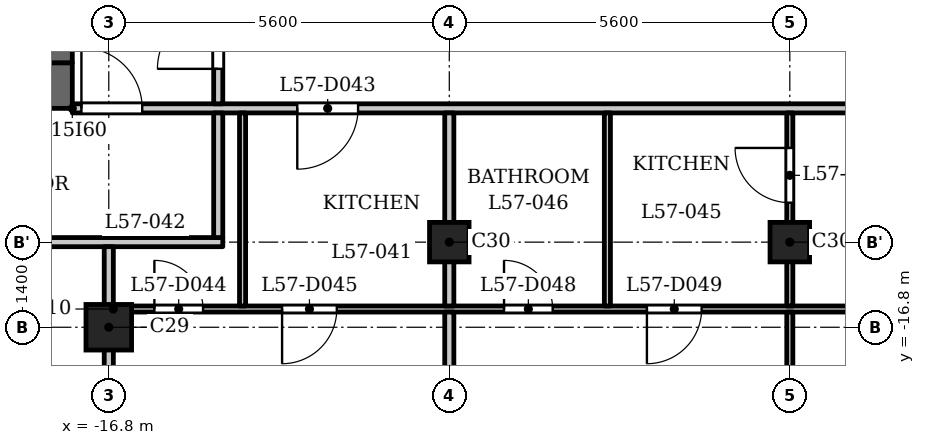
"""IFC4 building model, lengths in metres.
Left out: names, types, materials, properties, quantities, classifications, styles, units other than length and angle.
Written with IfcOpenShell. Run it as: python <this file> out.ifc"""

import sys

from ifc_helpers import new_model, si_unit, direction, frame, frame_2d, origin, origin_2d, place, context, subcontext, project, spatial, rectangle, extrude, element, fill, save


model = new_model("IFC4")
c1 = context("Model", 3, precision=1e-05, world=origin(), true_north=direction((0.0, 1.0)))
c2 = subcontext(c1, "Body", "Model", "MODEL_VIEW")
j1 = project(units=[si_unit("LENGTHUNIT", "METRE"), si_unit("PLANEANGLEUNIT", "RADIAN")], contexts=[c1])
p1 = place(None, origin())
s1 = spatial("IfcSite", under=j1, at=p1, CompositionType="ELEMENT")
p2 = place(p1, origin())
s2 = spatial("IfcBuilding", under=s1, at=p2, CompositionType="ELEMENT")
p3 = place(p2, frame((0.0, 0.0, 220.4)))
s3 = spatial("IfcBuildingStorey", under=s2, at=p3, CompositionType="ELEMENT", Elevation=220.4)
p4 = place(p3, frame((-16.8, -16.8, 0.0), z_axis=(0.0, 0.0, 1.0), x_axis=(1.0, 0.0, 0.0)))
e1 = element("IfcColumn", 1, at=p4, inside=s3, PredefinedType="COLUMN", context=c2, shape_type="SweptSolid", body=[
    extrude(rectangle(XDim=0.75, YDim=0.75, at=origin_2d()), origin(), (0.0, 0.0, 1.0), 3.5),
])
for number, where, z_axis, x_axis in (
    (2, (-11.2, -15.4, 0.0), (0.0, 0.0, 1.0), (1.0, 0.0, 0.0)),
    (3, (-5.6, -15.4, 0.0), (0.0, 0.0, 1.0), (1.0, 0.0, 0.0)),
):
    element("IfcColumn", number, at=place(p3, frame(where, z_axis=z_axis, x_axis=x_axis)), inside=s3, PredefinedType="COLUMN", context=c2, shape_type="SweptSolid", body=[
        extrude(rectangle(XDim=0.65, YDim=0.65, at=origin_2d()), origin(), (0.0, 0.0, 1.0), 3.5),
    ])
p5 = place(p3, frame((-17.4, -12.825, 0.0), z_axis=(0.0, 0.0, 1.0), x_axis=(-1.0, 0.0, 0.0)))
e4 = element("IfcWall", 4, at=p5, inside=s3, PredefinedType="SHEAR", context=c2, shape_type="SweptSolid", body=[
    extrude(rectangle(XDim=7.6, YDim=0.75, at=frame_2d((3.8, 0.0))), origin(), (0.0, 0.0, 1.0), 3.2),
])
p6 = place(p3, frame((-17.6, -12.45, 0.0), z_axis=(0.0, 0.0, 1.0), x_axis=(0.0, 1.0, 0.0)))
e5 = element("IfcWall", 5, at=p6, inside=s3, PredefinedType="SHEAR", context=c2, shape_type="SweptSolid", body=[
    extrude(rectangle(XDim=24.9, YDim=0.4, at=frame_2d((12.45, 0.0))), origin(), (0.0, 0.0, 1.0), 3.2),
])
p7 = place(p6, frame((6.85, 0.0, 0.0)))
e6 = element("IfcOpeningElement", 6, at=p7, cuts=e5, PredefinedType="OPENING", context=c2, shape_type="SweptSolid", body=[
    extrude(rectangle(XDim=0.9, YDim=2.1, at=frame_2d((0.45, 1.05))), frame((0.0, 0.21, 0.0), z_axis=(0.0, -1.0, 0.0), x_axis=(1.0, 0.0, 0.0)), (0.0, 0.0, 1.0), 0.42),
])
p8 = place(p6, frame((10.45, 0.0, 0.0)))
e7 = element("IfcOpeningElement", 7, at=p8, cuts=e5, PredefinedType="OPENING", context=c2, shape_type="SweptSolid", body=[
    extrude(rectangle(XDim=0.9, YDim=2.1, at=frame_2d((0.45, 1.05))), frame((0.0, 0.21, 0.0), z_axis=(0.0, -1.0, 0.0), x_axis=(1.0, 0.0, 0.0)), (0.0, 0.0, 1.0), 0.42),
])
p9 = place(p6, frame((15.6, 0.0, 0.0)))
e8 = element("IfcOpeningElement", 8, at=p9, cuts=e5, PredefinedType="OPENING", context=c2, shape_type="SweptSolid", body=[
    extrude(rectangle(XDim=1.1, YDim=2.1, at=frame_2d((0.55, 1.05))), frame((0.0, 0.21, 0.0), z_axis=(0.0, -1.0, 0.0), x_axis=(1.0, 0.0, 0.0)), (0.0, 0.0, 1.0), 0.42),
])
p10 = place(p6, frame((18.0, 0.0, 0.0)))
e9 = element("IfcOpeningElement", 9, at=p10, cuts=e5, PredefinedType="OPENING", context=c2, shape_type="SweptSolid", body=[
    extrude(rectangle(XDim=1.1, YDim=2.1, at=frame_2d((0.55, 1.05))), frame((0.0, 0.21, 0.0), z_axis=(0.0, -1.0, 0.0), x_axis=(1.0, 0.0, 0.0)), (0.0, 0.0, 1.0), 0.42),
])
p11 = place(p6, frame((23.025, 0.0, 0.0)))
e10 = element("IfcOpeningElement", 10, at=p11, cuts=e5, PredefinedType="OPENING", context=c2, shape_type="SweptSolid", body=[
    extrude(rectangle(XDim=1.1, YDim=2.1, at=frame_2d((0.55, 1.05))), frame((0.0, 0.21, 0.0), z_axis=(0.0, -1.0, 0.0), x_axis=(1.0, 0.0, 0.0)), (0.0, 0.0, 1.0), 0.42),
])
p12 = place(p6, frame((0.775, 0.0, 0.0)))
e11 = element("IfcOpeningElement", 11, at=p12, cuts=e5, PredefinedType="OPENING", context=c2, shape_type="SweptSolid", body=[
    extrude(rectangle(XDim=1.1, YDim=2.1, at=frame_2d((0.55, 1.05))), frame((0.0, 0.21, 0.0), z_axis=(0.0, -1.0, 0.0), x_axis=(1.0, 0.0, 0.0)), (0.0, 0.0, 1.0), 0.42),
])
p13 = place(p6, frame((12.925, 0.0, 0.0)))
e12 = element("IfcOpeningElement", 12, at=p13, cuts=e5, PredefinedType="OPENING", context=c2, shape_type="SweptSolid", body=[
    extrude(rectangle(XDim=1.8, YDim=2.1, at=frame_2d((0.9, 1.05))), frame((0.0, 0.21, 0.0), z_axis=(0.0, -1.0, 0.0), x_axis=(1.0, 0.0, 0.0)), (0.0, 0.0, 1.0), 0.42),
])
p14 = place(p3, frame((-16.725, -16.5, 0.0), z_axis=(0.0, 0.0, 1.0), x_axis=(1.0, 0.0, 0.0)))
e13 = element("IfcWall", 13, at=p14, inside=s3, PredefinedType="PARTITIONING", context=c2, shape_type="SweptSolid", body=[
    extrude(rectangle(XDim=33.45, YDim=0.1, at=frame_2d((16.725, 0.0))), origin(), (0.0, 0.0, 1.0), 3.2),
])
p15 = place(p14, frame((0.675, 0.0, 0.0)))
e14 = element("IfcOpeningElement", 14, at=p15, cuts=e13, PredefinedType="OPENING", context=c2, shape_type="SweptSolid", body=[
    extrude(rectangle(XDim=0.8, YDim=2.1, at=frame_2d((0.4, 1.05))), frame((0.0, 0.06, 0.0), z_axis=(0.0, -1.0, 0.0), x_axis=(1.0, 0.0, 0.0)), (0.0, 0.0, 1.0), 0.12),
])
p16 = place(p14, frame((2.775, 0.0, 0.0)))
e15 = element("IfcOpeningElement", 15, at=p16, cuts=e13, PredefinedType="OPENING", context=c2, shape_type="SweptSolid", body=[
    extrude(rectangle(XDim=0.9, YDim=2.1, at=frame_2d((0.45, 1.05))), frame((0.0, 0.06, 0.0), z_axis=(0.0, -1.0, 0.0), x_axis=(1.0, 0.0, 0.0)), (0.0, 0.0, 1.0), 0.12),
])
p17 = place(p14, frame((6.425, 0.0, 0.0)))
e16 = element("IfcOpeningElement", 16, at=p17, cuts=e13, PredefinedType="OPENING", context=c2, shape_type="SweptSolid", body=[
    extrude(rectangle(XDim=0.8, YDim=2.1, at=frame_2d((0.4, 1.05))), frame((0.0, 0.06, 0.0), z_axis=(0.0, -1.0, 0.0), x_axis=(1.0, 0.0, 0.0)), (0.0, 0.0, 1.0), 0.12),
])
p18 = place(p14, frame((8.775, 0.0, 0.0)))
e17 = element("IfcOpeningElement", 17, at=p18, cuts=e13, PredefinedType="OPENING", context=c2, shape_type="SweptSolid", body=[
    extrude(rectangle(XDim=0.9, YDim=2.1, at=frame_2d((0.45, 1.05))), frame((0.0, 0.06, 0.0), z_axis=(0.0, -1.0, 0.0), x_axis=(1.0, 0.0, 0.0)), (0.0, 0.0, 1.0), 0.12),
])
p19 = place(p14, frame((12.525, 0.0, 0.0)))
e18 = element("IfcOpeningElement", 18, at=p19, cuts=e13, PredefinedType="OPENING", context=c2, shape_type="SweptSolid", body=[
    extrude(rectangle(XDim=0.9, YDim=2.1, at=frame_2d((0.45, 1.05))), frame((0.0, 0.06, 0.0), z_axis=(0.0, -1.0, 0.0), x_axis=(1.0, 0.0, 0.0)), (0.0, 0.0, 1.0), 0.12),
])
p20 = place(p14, frame((14.775, 0.0, 0.0)))
e19 = element("IfcOpeningElement", 19, at=p20, cuts=e13, PredefinedType="OPENING", context=c2, shape_type="SweptSolid", body=[
    extrude(rectangle(XDim=0.9, YDim=2.1, at=frame_2d((0.45, 1.05))), frame((0.0, 0.06, 0.0), z_axis=(0.0, -1.0, 0.0), x_axis=(1.0, 0.0, 0.0)), (0.0, 0.0, 1.0), 0.12),
])
p21 = place(p14, frame((25.475, 0.0, 0.0)))
e20 = element("IfcOpeningElement", 20, at=p21, cuts=e13, PredefinedType="OPENING", context=c2, shape_type="SweptSolid", body=[
    extrude(rectangle(XDim=0.8, YDim=2.1, at=frame_2d((0.4, 1.05))), frame((0.0, 0.06, 0.0), z_axis=(0.0, -1.0, 0.0), x_axis=(1.0, 0.0, 0.0)), (0.0, 0.0, 1.0), 0.12),
])
p22 = place(p14, frame((23.225, 0.0, 0.0)))
e21 = element("IfcOpeningElement", 21, at=p22, cuts=e13, PredefinedType="OPENING", context=c2, shape_type="SweptSolid", body=[
    extrude(rectangle(XDim=0.9, YDim=2.1, at=frame_2d((0.45, 1.05))), frame((0.0, 0.06, 0.0), z_axis=(0.0, -1.0, 0.0), x_axis=(1.0, 0.0, 0.0)), (0.0, 0.0, 1.0), 0.12),
])
p23 = place(p14, frame((17.875, 0.0, 0.0)))
e22 = element("IfcOpeningElement", 22, at=p23, cuts=e13, PredefinedType="OPENING", context=c2, shape_type="SweptSolid", body=[
    extrude(rectangle(XDim=0.9, YDim=2.1, at=frame_2d((0.45, 1.05))), frame((0.0, 0.06, 0.0), z_axis=(0.0, -1.0, 0.0), x_axis=(1.0, 0.0, 0.0)), (0.0, 0.0, 1.0), 0.12),
])
p24 = place(p14, frame((19.975, 0.0, 0.0)))
e23 = element("IfcOpeningElement", 23, at=p24, cuts=e13, PredefinedType="OPENING", context=c2, shape_type="SweptSolid", body=[
    extrude(rectangle(XDim=0.9, YDim=2.1, at=frame_2d((0.45, 1.05))), frame((0.0, 0.06, 0.0), z_axis=(0.0, -1.0, 0.0), x_axis=(1.0, 0.0, 0.0)), (0.0, 0.0, 1.0), 0.12),
])
p25 = place(p14, frame((30.825, 0.0, 0.0)))
e24 = element("IfcOpeningElement", 24, at=p25, cuts=e13, PredefinedType="OPENING", context=c2, shape_type="SweptSolid", body=[
    extrude(rectangle(XDim=0.8, YDim=2.1, at=frame_2d((0.4, 1.05))), frame((0.0, 0.06, 0.0), z_axis=(0.0, -1.0, 0.0), x_axis=(1.0, 0.0, 0.0)), (0.0, 0.0, 1.0), 0.12),
])
p26 = place(p14, frame((29.075, 0.0, 0.0)))
e25 = element("IfcOpeningElement", 25, at=p26, cuts=e13, PredefinedType="OPENING", context=c2, shape_type="SweptSolid", body=[
    extrude(rectangle(XDim=0.9, YDim=2.1, at=frame_2d((0.45, 1.05))), frame((0.0, 0.06, 0.0), z_axis=(0.0, -1.0, 0.0), x_axis=(1.0, 0.0, 0.0)), (0.0, 0.0, 1.0), 0.12),
])
p27 = place(p3, frame((-24.684, -15.4, 0.0), z_axis=(0.0, 0.0, 1.0), x_axis=(1.0, 0.0, 0.0)))
e26 = element("IfcWall", 26, at=p27, inside=s3, PredefinedType="PARTITIONING", context=c2, shape_type="SweptSolid", body=[
    extrude(rectangle(XDim=9.759, YDim=0.15, at=frame_2d((4.879, 0.0))), origin(), (0.0, 0.0, 1.0), 3.2),
])
p28 = place(p27, frame((1.143, 0.0, 0.0)))
e27 = element("IfcOpeningElement", 27, at=p28, cuts=e26, PredefinedType="OPENING", context=c2, shape_type="SweptSolid", body=[
    extrude(rectangle(XDim=1.0, YDim=2.1, at=frame_2d((0.5, 1.05))), frame((0.0, 0.085, 0.0), z_axis=(0.0, -1.0, 0.0), x_axis=(1.0, 0.0, 0.0)), (0.0, 0.0, 1.0), 0.17),
])
p29 = place(p3, frame((-17.4, -13.2, 0.0), z_axis=(0.0, 0.0, 1.0), x_axis=(1.0, 0.0, 0.0)))
e28 = element("IfcWall", 28, at=p29, inside=s3, PredefinedType="PARTITIONING", context=c2, shape_type="SweptSolid", body=[
    extrude(rectangle(XDim=34.8, YDim=0.15, at=frame_2d((17.4, 0.0))), origin(), (0.0, 0.0, 1.0), 3.2),
])
p30 = place(p29, frame((0.15, 0.0, 0.0)))
e29 = element("IfcOpeningElement", 29, at=p30, cuts=e28, PredefinedType="OPENING", context=c2, shape_type="SweptSolid", body=[
    extrude(rectangle(XDim=1.0, YDim=2.1, at=frame_2d((0.5, 1.05))), frame((0.0, 0.085, 0.0), z_axis=(0.0, -1.0, 0.0), x_axis=(1.0, 0.0, 0.0)), (0.0, 0.0, 1.0), 0.17),
])
p31 = place(p29, frame((33.55, 0.0, 0.0)))
e30 = element("IfcOpeningElement", 30, at=p31, cuts=e28, PredefinedType="OPENING", context=c2, shape_type="SweptSolid", body=[
    extrude(rectangle(XDim=1.0, YDim=2.1, at=frame_2d((0.5, 1.05))), frame((0.0, 0.085, 0.0), z_axis=(0.0, -1.0, 0.0), x_axis=(1.0, 0.0, 0.0)), (0.0, 0.0, 1.0), 0.17),
])
p32 = place(p29, frame((3.7, 0.0, 0.0)))
e31 = element("IfcOpeningElement", 31, at=p32, cuts=e28, PredefinedType="OPENING", context=c2, shape_type="SweptSolid", body=[
    extrude(rectangle(XDim=1.0, YDim=2.1, at=frame_2d((0.5, 1.05))), frame((0.0, 0.085, 0.0), z_axis=(0.0, -1.0, 0.0), x_axis=(1.0, 0.0, 0.0)), (0.0, 0.0, 1.0), 0.17),
])
p33 = place(p29, frame((15.7, 0.0, 0.0)))
e32 = element("IfcOpeningElement", 32, at=p33, cuts=e28, PredefinedType="OPENING", context=c2, shape_type="SweptSolid", body=[
    extrude(rectangle(XDim=1.0, YDim=2.1, at=frame_2d((0.5, 1.05))), frame((0.0, 0.085, 0.0), z_axis=(0.0, -1.0, 0.0), x_axis=(1.0, 0.0, 0.0)), (0.0, 0.0, 1.0), 0.17),
])
p34 = place(p29, frame((21.3, 0.0, 0.0)))
e33 = element("IfcOpeningElement", 33, at=p34, cuts=e28, PredefinedType="OPENING", context=c2, shape_type="SweptSolid", body=[
    extrude(rectangle(XDim=1.0, YDim=2.1, at=frame_2d((0.5, 1.05))), frame((0.0, 0.085, 0.0), z_axis=(0.0, -1.0, 0.0), x_axis=(1.0, 0.0, 0.0)), (0.0, 0.0, 1.0), 0.17),
])
p35 = place(p29, frame((29.5, 0.0, 0.0)))
e34 = element("IfcOpeningElement", 34, at=p35, cuts=e28, PredefinedType="OPENING", context=c2, shape_type="SweptSolid", body=[
    extrude(rectangle(XDim=1.0, YDim=2.1, at=frame_2d((0.5, 1.05))), frame((0.0, 0.085, 0.0), z_axis=(0.0, -1.0, 0.0), x_axis=(1.0, 0.0, 0.0)), (0.0, 0.0, 1.0), 0.17),
])
p36 = place(p3, frame((-16.8, -22.31, 0.0), z_axis=(0.0, 0.0, 1.0), x_axis=(0.0, 1.0, 0.0)))
e35 = element("IfcWall", 35, at=p36, inside=s3, PredefinedType="PARTITIONING", context=c2, shape_type="SweptSolid", body=[
    extrude(rectangle(XDim=6.835, YDim=0.15, at=frame_2d((3.417, 0.0))), origin(), (0.0, 0.0, 1.0), 2.55),
])
p37 = place(p3, frame((-15.0, -15.325, 0.0), z_axis=(0.0, 0.0, 1.0), x_axis=(0.0, 1.0, 0.0)))
e36 = element("IfcWall", 36, at=p37, inside=s3, PredefinedType="PARTITIONING", context=c2, shape_type="SweptSolid", body=[
    extrude(rectangle(XDim=2.05, YDim=0.15, at=frame_2d((1.025, 0.0))), origin(), (0.0, 0.0, 1.0), 3.2),
])
p38 = place(p3, frame((-15.0, -13.125, 0.0), z_axis=(0.0, 0.0, 1.0), x_axis=(0.0, 1.0, 0.0)))
e37 = element("IfcWall", 37, at=p38, inside=s3, PredefinedType="PARTITIONING", context=c2, shape_type="SweptSolid", body=[
    extrude(rectangle(XDim=6.356, YDim=0.15, at=frame_2d((3.178, 0.0))), origin(), (0.0, 0.0, 1.0), 3.2),
])
p39 = place(p38, frame((0.575, 0.0, 0.0)))
e38 = element("IfcOpeningElement", 38, at=p39, cuts=e37, PredefinedType="OPENING", context=c2, shape_type="SweptSolid", body=[
    extrude(rectangle(XDim=1.0, YDim=2.1, at=frame_2d((0.5, 1.05))), frame((0.0, 0.085, 0.0), z_axis=(0.0, -1.0, 0.0), x_axis=(1.0, 0.0, 0.0)), (0.0, 0.0, 1.0), 0.17),
])
p40 = place(p3, frame((-14.6, -16.45, 0.0), z_axis=(0.0, 0.0, 1.0), x_axis=(0.0, 1.0, 0.0)))
e39 = element("IfcWall", 39, at=p40, inside=s3, PredefinedType="PARTITIONING", context=c2, shape_type="SweptSolid", body=[
    extrude(rectangle(XDim=3.175, YDim=0.1, at=frame_2d((1.587, 0.0))), origin(), (0.0, 0.0, 1.0), 3.2),
])
p41 = place(p3, frame((-11.2, -22.08, 0.0), z_axis=(0.0, 0.0, 1.0), x_axis=(0.0, 1.0, 0.0)))
e40 = element("IfcWall", 40, at=p41, inside=s3, PredefinedType="PARTITIONING", context=c2, shape_type="SweptSolid", body=[
    extrude(rectangle(XDim=5.53, YDim=0.15, at=frame_2d((2.765, 0.0))), origin(), (0.0, 0.0, 1.0), 3.2),
])
p42 = place(p3, frame((-11.2, -16.45, 0.0), z_axis=(0.0, 0.0, 1.0), x_axis=(0.0, 1.0, 0.0)))
e41 = element("IfcWall", 41, at=p42, inside=s3, PredefinedType="PARTITIONING", context=c2, shape_type="SweptSolid", body=[
    extrude(rectangle(XDim=3.175, YDim=0.15, at=frame_2d((1.587, 0.0))), origin(), (0.0, 0.0, 1.0), 3.2),
])
p43 = place(p3, frame((-8.6, -16.45, 0.0), z_axis=(0.0, 0.0, 1.0), x_axis=(0.0, 1.0, 0.0)))
e42 = element("IfcWall", 42, at=p43, inside=s3, PredefinedType="PARTITIONING", context=c2, shape_type="SweptSolid", body=[
    extrude(rectangle(XDim=3.175, YDim=0.1, at=frame_2d((1.587, 0.0))), origin(), (0.0, 0.0, 1.0), 3.2),
])
p44 = place(p3, frame((-5.6, -22.08, 0.0), z_axis=(0.0, 0.0, 1.0), x_axis=(0.0, 1.0, 0.0)))
e43 = element("IfcWall", 43, at=p44, inside=s3, PredefinedType="PARTITIONING", context=c2, shape_type="SweptSolid", body=[
    extrude(rectangle(XDim=5.53, YDim=0.1, at=frame_2d((2.765, 0.0))), origin(), (0.0, 0.0, 1.0), 3.2),
])
p45 = place(p3, frame((-5.6, -16.45, 0.0), z_axis=(0.0, 0.0, 1.0), x_axis=(0.0, 1.0, 0.0)))
e44 = element("IfcWall", 44, at=p45, inside=s3, PredefinedType="PARTITIONING", context=c2, shape_type="SweptSolid", body=[
    extrude(rectangle(XDim=3.175, YDim=0.1, at=frame_2d((1.587, 0.0))), origin(), (0.0, 0.0, 1.0), 3.2),
])
p46 = place(p45, frame((1.699, 0.0, 0.0)))
e45 = element("IfcOpeningElement", 45, at=p46, cuts=e44, PredefinedType="OPENING", context=c2, shape_type="SweptSolid", body=[
    extrude(rectangle(XDim=0.9, YDim=2.1, at=frame_2d((0.45, 1.05))), frame((0.0, 0.06, 0.0), z_axis=(0.0, -1.0, 0.0), x_axis=(1.0, 0.0, 0.0)), (0.0, 0.0, 1.0), 0.12),
])
p47 = place(p39, origin())
e46 = element("IfcDoor", 46, at=p47, inside=s3, OperationType="SINGLE_SWING_RIGHT", PredefinedType="DOOR", context=c2, shape_type="SweptSolid", body=[
    extrude(rectangle(XDim=1.0, YDim=2.1, at=frame_2d((0.5, 1.05))), frame((0.0, 0.025, 0.0), z_axis=(0.0, -1.0, 0.0), x_axis=(1.0, 0.0, 0.0)), (0.0, 0.0, 1.0), 0.05),
])
fill(e38, e46)
p48 = place(p30, origin())
e47 = element("IfcDoor", 47, at=p48, inside=s3, OperationType="SINGLE_SWING_RIGHT", PredefinedType="DOOR", context=c2, shape_type="SweptSolid", body=[
    extrude(rectangle(XDim=1.0, YDim=2.1, at=frame_2d((0.5, 1.05))), frame((0.0, 0.025, 0.0), z_axis=(0.0, -1.0, 0.0), x_axis=(1.0, 0.0, 0.0)), (0.0, 0.0, 1.0), 0.05),
])
fill(e29, e47)
p49 = place(p32, origin())
e48 = element("IfcDoor", 48, at=p49, inside=s3, OperationType="SINGLE_SWING_LEFT", PredefinedType="DOOR", context=c2, shape_type="SweptSolid", body=[
    extrude(rectangle(XDim=1.0, YDim=2.1, at=frame_2d((0.5, 1.05))), frame((0.0, 0.025, 0.0), z_axis=(0.0, -1.0, 0.0), x_axis=(1.0, 0.0, 0.0)), (0.0, 0.0, 1.0), 0.05),
])
fill(e31, e48)
p50 = place(p15, origin())
e49 = element("IfcDoor", 49, at=p50, inside=s3, OperationType="SINGLE_SWING_RIGHT", PredefinedType="DOOR", context=c2, shape_type="SweptSolid", body=[
    extrude(rectangle(XDim=0.8, YDim=2.1, at=frame_2d((0.4, 1.05))), frame((0.0, 0.025, 0.0), z_axis=(0.0, -1.0, 0.0), x_axis=(1.0, 0.0, 0.0)), (0.0, 0.0, 1.0), 0.05),
])
fill(e14, e49)
p51 = place(p16, origin())
e50 = element("IfcDoor", 50, at=p51, inside=s3, OperationType="SINGLE_SWING_LEFT", PredefinedType="DOOR", context=c2, shape_type="SweptSolid", body=[
    extrude(rectangle(XDim=0.9, YDim=2.1, at=frame_2d((0.45, 1.05))), frame((0.0, 0.025, 0.0), z_axis=(0.0, -1.0, 0.0), x_axis=(1.0, 0.0, 0.0)), (0.0, 0.0, 1.0), 0.05),
])
fill(e15, e50)
p52 = place(p46, origin())
e51 = element("IfcDoor", 51, at=p52, inside=s3, OperationType="SINGLE_SWING_LEFT", PredefinedType="DOOR", context=c2, shape_type="SweptSolid", body=[
    extrude(rectangle(XDim=0.9, YDim=2.1, at=frame_2d((0.45, 1.05))), frame((0.0, 0.025, 0.0), z_axis=(0.0, -1.0, 0.0), x_axis=(1.0, 0.0, 0.0)), (0.0, 0.0, 1.0), 0.05),
])
fill(e45, e51)
p53 = place(p17, origin())
e52 = element("IfcDoor", 52, at=p53, inside=s3, OperationType="SINGLE_SWING_RIGHT", PredefinedType="DOOR", context=c2, shape_type="SweptSolid", body=[
    extrude(rectangle(XDim=0.8, YDim=2.1, at=frame_2d((0.4, 1.05))), frame((0.0, 0.025, 0.0), z_axis=(0.0, -1.0, 0.0), x_axis=(1.0, 0.0, 0.0)), (0.0, 0.0, 1.0), 0.05),
])
fill(e16, e52)
p54 = place(p18, origin())
e53 = element("IfcDoor", 53, at=p54, inside=s3, OperationType="SINGLE_SWING_LEFT", PredefinedType="DOOR", context=c2, shape_type="SweptSolid", body=[
    extrude(rectangle(XDim=0.9, YDim=2.1, at=frame_2d((0.45, 1.05))), frame((0.0, 0.025, 0.0), z_axis=(0.0, -1.0, 0.0), x_axis=(1.0, 0.0, 0.0)), (0.0, 0.0, 1.0), 0.05),
])
fill(e17, e53)
save(model, sys.argv[1])
